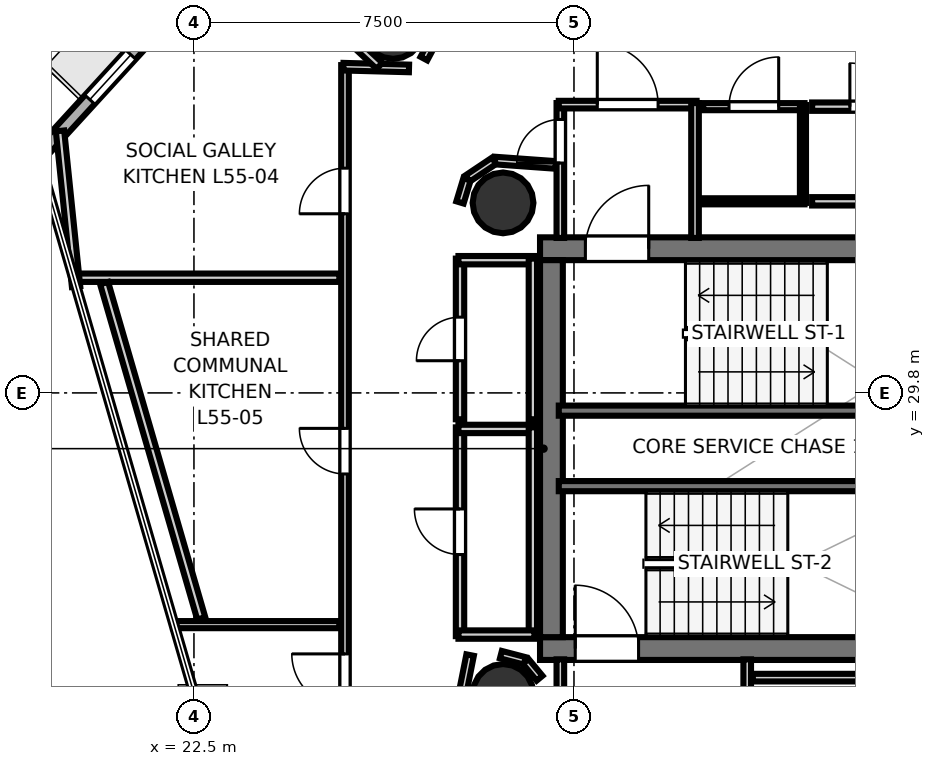
"""IFC4 building model, lengths in metres.
Left out: names, types, materials, properties, quantities, classifications, styles, units other than length and angle.
Written with IfcOpenShell. Run it as: python <this file> out.ifc"""

import sys

from ifc_helpers import new_model, si_unit, direction, frame, frame_2d, origin, origin_2d, place, context, subcontext, project, spatial, rectangle, hollow_circle, extrude, element, fill, save


model = new_model("IFC4")
c1 = context("Model", 3, precision=1e-05, world=origin(), true_north=direction((0.0, 1.0)))
c2 = subcontext(c1, "Body", "Model", "MODEL_VIEW")
j1 = project(units=[si_unit("LENGTHUNIT", "METRE"), si_unit("PLANEANGLEUNIT", "RADIAN")], contexts=[c1])
p1 = place(None, origin())
s1 = spatial("IfcSite", under=j1, at=p1, CompositionType="ELEMENT")
p2 = place(p1, origin())
s2 = spatial("IfcBuilding", under=s1, at=p2, CompositionType="ELEMENT")
p3 = place(p2, frame((0.0, 0.0, 215.1)))
s3 = spatial("IfcBuildingStorey", under=s2, at=p3, CompositionType="ELEMENT", Elevation=215.1)
p4 = place(p3, frame((29.33, 32.645, 0.0), z_axis=(0.0, 0.0, 1.0), x_axis=(1.0, 0.0, 0.0)))
e1 = element("IfcWall", 1, at=p4, inside=s3, PredefinedType="SHEAR", context=c2, shape_type="SweptSolid", body=[
    extrude(rectangle(XDim=10.52, YDim=0.45, at=frame_2d((5.26, 0.0))), origin(), (0.0, 0.0, 1.0), 3.52),
])
p5 = place(p4, frame((0.895, 0.0, 0.0)))
e2 = element("IfcOpeningElement", 2, at=p5, cuts=e1, PredefinedType="OPENING", context=c2, shape_type="SweptSolid", body=[
    extrude(rectangle(XDim=1.25, YDim=2.15, at=frame_2d((0.625, 1.075))), frame((0.0, 0.235, 0.0), z_axis=(0.0, -1.0, 0.0), x_axis=(1.0, 0.0, 0.0)), (0.0, 0.0, 1.0), 0.47),
])
p6 = place(p3, frame((29.33, 24.755, 0.0), z_axis=(0.0, 0.0, 1.0), x_axis=(1.0, 0.0, 0.0)))
e3 = element("IfcWall", 3, at=p6, inside=s3, PredefinedType="SHEAR", context=c2, shape_type="SweptSolid", body=[
    extrude(rectangle(XDim=10.52, YDim=0.45, at=frame_2d((5.26, 0.0))), origin(), (0.0, 0.0, 1.0), 3.52),
])
p7 = place(p6, frame((0.695, 0.0, 0.0)))
e4 = element("IfcOpeningElement", 4, at=p7, cuts=e3, PredefinedType="OPENING", context=c2, shape_type="SweptSolid", body=[
    extrude(rectangle(XDim=1.25, YDim=2.15, at=frame_2d((0.625, 1.075))), frame((0.0, 0.235, 0.0), z_axis=(0.0, -1.0, 0.0), x_axis=(1.0, 0.0, 0.0)), (0.0, 0.0, 1.0), 0.47),
])
p8 = place(p3, frame((29.555, 24.98, 0.0), z_axis=(0.0, 0.0, 1.0), x_axis=(0.0, 1.0, 0.0)))
e5 = element("IfcWall", 5, at=p8, inside=s3, PredefinedType="SHEAR", context=c2, shape_type="SweptSolid", body=[
    extrude(rectangle(XDim=7.44, YDim=0.45, at=frame_2d((3.72, 0.0))), origin(), (0.0, 0.0, 1.0), 3.52),
])
for number, where, z_axis, x_axis in (
    (6, (28.6, 33.55, 0.0), (0.0, 0.0, 1.0), (1.0, 0.0, 0.0)),
    (7, (28.6, 23.85, 0.0), (0.0, 0.0, 1.0), (1.0, 0.0, 0.0)),
    (8, (26.431, 36.992, 0.0), (0.0, 0.0, 1.0), (1.0, 0.0, 0.0)),
):
    element("IfcColumn", number, at=place(p3, frame(where, z_axis=z_axis, x_axis=x_axis)), inside=s3, PredefinedType="COLUMN", context=c2, shape_type="SweptSolid", body=[
        extrude(hollow_circle(Radius=0.6, WallThickness=0.03, at=origin_2d()), origin(), (0.0, 0.0, 1.0), 3.7),
    ])
p9 = place(p3, frame((24.17, 39.66, 0.0), z_axis=(0.0, 0.0, 1.0), x_axis=(-0.674986503916, -0.73783007497, 0.0)))
e9 = element("IfcWall", 9, at=p9, inside=s3, PredefinedType="SOLIDWALL", context=c2, shape_type="SweptSolid", body=[
    extrude(rectangle(XDim=7.028, YDim=0.26, at=frame_2d((3.514, 0.0))), origin(), (0.0, 0.0, 1.0), 3.52),
])
p10 = place(p9, frame((1.508, 0.0, 0.9)))
e10 = element("IfcOpeningElement", 10, at=p10, cuts=e9, PredefinedType="OPENING", context=c2, shape_type="SweptSolid", body=[
    extrude(rectangle(XDim=1.2, YDim=2.0, at=frame_2d((0.6, 1.0))), frame((0.0, 0.14, 0.0), z_axis=(0.0, -1.0, 0.0), x_axis=(1.0, 0.0, 0.0)), (0.0, 0.0, 1.0), 0.28),
])
p11 = place(p9, frame((4.32, 0.0, 0.9)))
e11 = element("IfcOpeningElement", 11, at=p11, cuts=e9, PredefinedType="OPENING", context=c2, shape_type="SweptSolid", body=[
    extrude(rectangle(XDim=1.2, YDim=2.0, at=frame_2d((0.6, 1.0))), frame((0.0, 0.14, 0.0), z_axis=(0.0, -1.0, 0.0), x_axis=(1.0, 0.0, 0.0)), (0.0, 0.0, 1.0), 0.28),
])
p12 = place(p3, frame((29.7, 29.45, 0.0), z_axis=(0.0, 0.0, 1.0), x_axis=(1.0, 0.0, 0.0)))
e12 = element("IfcWall", 12, at=p12, inside=s3, PredefinedType="SOLIDWALL", context=c2, shape_type="SweptSolid", body=[
    extrude(rectangle(XDim=8.3, YDim=0.2, at=frame_2d((4.15, 0.0))), origin(), (0.0, 0.0, 1.0), 3.52),
])
p13 = place(p3, frame((29.7, 27.96, 0.0), z_axis=(0.0, 0.0, 1.0), x_axis=(1.0, 0.0, 0.0)))
e13 = element("IfcWall", 13, at=p13, inside=s3, PredefinedType="SOLIDWALL", context=c2, shape_type="SweptSolid", body=[
    extrude(rectangle(XDim=7.75, YDim=0.2, at=frame_2d((3.875, 0.0))), origin(), (0.0, 0.0, 1.0), 3.52),
])
p14 = place(p3, frame((29.731, 32.858, 0.0), z_axis=(0.0, 0.0, 1.0), x_axis=(0.0, 1.0, 0.0)))
e14 = element("IfcWall", 14, at=p14, inside=s3, PredefinedType="PARTITIONING", context=c2, shape_type="SweptSolid", body=[
    extrude(rectangle(XDim=2.662, YDim=0.15, at=frame_2d((1.331, 0.0))), origin(), (0.0, 0.0, 1.0), 2.84),
])
p15 = place(p14, frame((1.478, 0.0, 0.0)))
e15 = element("IfcOpeningElement", 15, at=p15, cuts=e14, PredefinedType="OPENING", context=c2, shape_type="SweptSolid", body=[
    extrude(rectangle(XDim=0.86, YDim=2.05, at=frame_2d((0.43, 1.025))), frame((0.0, 0.085, 0.0), z_axis=(0.0, -1.0, 0.0), x_axis=(1.0, 0.0, 0.0)), (0.0, 0.0, 1.0), 0.17),
])
p16 = place(p3, frame((29.7, 35.489, 0.0), z_axis=(0.0, 0.0, 1.0), x_axis=(1.0, 0.0, 0.0)))
e16 = element("IfcWall", 16, at=p16, inside=s3, PredefinedType="PARTITIONING", context=c2, shape_type="SweptSolid", body=[
    extrude(rectangle(XDim=2.72, YDim=0.15, at=frame_2d((1.36, 0.0))), origin(), (0.0, 0.0, 1.0), 2.84),
])
p17 = place(p16, frame((0.76, 0.0, 0.0)))
e17 = element("IfcOpeningElement", 17, at=p17, cuts=e16, PredefinedType="OPENING", context=c2, shape_type="SweptSolid", body=[
    extrude(rectangle(XDim=1.2, YDim=2.15, at=frame_2d((0.6, 1.075))), frame((0.0, 0.085, 0.0), z_axis=(0.0, -1.0, 0.0), x_axis=(1.0, 0.0, 0.0)), (0.0, 0.0, 1.0), 0.17),
])
p18 = place(p3, frame((32.389, 35.52, 0.0), z_axis=(0.0, 0.0, 1.0), x_axis=(0.0, -1.0, 0.0)))
e18 = element("IfcWall", 18, at=p18, inside=s3, PredefinedType="PARTITIONING", context=c2, shape_type="SweptSolid", body=[
    extrude(rectangle(XDim=2.662, YDim=0.15, at=frame_2d((1.331, 0.0))), origin(), (0.0, 0.0, 1.0), 2.84),
])
for number, where, z_axis, x_axis in (
    (19, (29.731, 21.85, 0.0), (0.0, 0.0, 1.0), (0.0, 1.0, 0.0)),
    (20, (33.419, 24.542, 0.0), (0.0, 0.0, 1.0), (0.0, -1.0, 0.0)),
):
    element("IfcWall", number, at=place(p3, frame(where, z_axis=z_axis, x_axis=x_axis)), inside=s3, PredefinedType="PARTITIONING", context=c2, shape_type="SweptSolid", body=[
        extrude(rectangle(XDim=2.692, YDim=0.15, at=frame_2d((1.346, 0.0))), origin(), (0.0, 0.0, 1.0), 2.84),
    ])
p19 = place(p3, frame((34.55, 33.581, 0.0), z_axis=(0.0, 0.0, 1.0), x_axis=(-1.0, 0.0, 0.0)))
e21 = element("IfcWall", 21, at=p19, inside=s3, PredefinedType="PARTITIONING", context=c2, shape_type="SweptSolid", body=[
    extrude(rectangle(XDim=2.0, YDim=0.12, at=frame_2d((1.0, 0.0))), origin(), (0.0, 0.0, 1.0), 2.84),
])
p20 = place(p3, frame((32.55, 35.449, 0.0), z_axis=(0.0, 0.0, 1.0), x_axis=(1.0, 0.0, 0.0)))
e22 = element("IfcWall", 22, at=p20, inside=s3, PredefinedType="PARTITIONING", context=c2, shape_type="SweptSolid", body=[
    extrude(rectangle(XDim=2.0, YDim=0.14, at=frame_2d((1.0, 0.0))), origin(), (0.0, 0.0, 1.0), 2.84),
])
p21 = place(p20, frame((0.51, 0.0, 0.0)))
e23 = element("IfcOpeningElement", 23, at=p21, cuts=e22, PredefinedType="OPENING", context=c2, shape_type="SweptSolid", body=[
    extrude(rectangle(XDim=0.98, YDim=2.1, at=frame_2d((0.49, 1.05))), frame((0.0, 0.08, 0.0), z_axis=(0.0, -1.0, 0.0), x_axis=(1.0, 0.0, 0.0)), (0.0, 0.0, 1.0), 0.16),
])
p22 = place(p3, frame((34.519, 35.48, 0.0), z_axis=(0.0, 0.0, 1.0), x_axis=(0.0, -1.0, 0.0)))
e24 = element("IfcWall", 24, at=p22, inside=s3, PredefinedType="PARTITIONING", context=c2, shape_type="SweptSolid", body=[
    extrude(rectangle(XDim=1.93, YDim=0.12, at=frame_2d((0.965, 0.0))), origin(), (0.0, 0.0, 1.0), 2.84),
])
p23 = place(p3, frame((37.05, 33.581, 0.0), z_axis=(0.0, 0.0, 1.0), x_axis=(-1.0, 0.0, 0.0)))
e25 = element("IfcWall", 25, at=p23, inside=s3, PredefinedType="PLUMBINGWALL", context=c2, shape_type="SweptSolid", body=[
    extrude(rectangle(XDim=2.35, YDim=0.165, at=frame_2d((1.175, 0.0))), origin(), (0.0, 0.0, 1.0), 2.84),
])
p24 = place(p3, frame((34.7, 35.449, 0.0), z_axis=(0.0, 0.0, 1.0), x_axis=(1.0, 0.0, 0.0)))
e26 = element("IfcWall", 26, at=p24, inside=s3, PredefinedType="PLUMBINGWALL", context=c2, shape_type="SweptSolid", body=[
    extrude(rectangle(XDim=2.35, YDim=0.165, at=frame_2d((1.175, 0.0))), origin(), (0.0, 0.0, 1.0), 2.84),
])
p25 = place(p24, frame((0.745, 0.0, 0.0)))
e27 = element("IfcOpeningElement", 27, at=p25, cuts=e26, PredefinedType="OPENING", context=c2, shape_type="SweptSolid", body=[
    extrude(rectangle(XDim=0.86, YDim=2.05, at=frame_2d((0.43, 1.025))), frame((0.0, 0.093, 0.0), z_axis=(0.0, -1.0, 0.0), x_axis=(1.0, 0.0, 0.0)), (0.0, 0.0, 1.0), 0.185),
])
p26 = place(p3, frame((27.751, 25.0, 0.0), z_axis=(0.0, 0.0, 1.0), x_axis=(0.0, 1.0, 0.0)))
e28 = element("IfcWall", 28, at=p26, inside=s3, PredefinedType="PLUMBINGWALL", context=c2, shape_type="SweptSolid", body=[
    extrude(rectangle(XDim=4.12, YDim=0.165, at=frame_2d((2.06, 0.0))), origin(), (0.0, 0.0, 1.0), 2.84),
])
p27 = place(p26, frame((1.61, 0.0, 0.0)))
e29 = element("IfcOpeningElement", 29, at=p27, cuts=e28, PredefinedType="OPENING", context=c2, shape_type="SweptSolid", body=[
    extrude(rectangle(XDim=0.9, YDim=2.1, at=frame_2d((0.45, 1.05))), frame((0.0, 0.093, 0.0), z_axis=(0.0, -1.0, 0.0), x_axis=(1.0, 0.0, 0.0)), (0.0, 0.0, 1.0), 0.185),
])
p28 = place(p3, frame((27.72, 29.089, 0.0), z_axis=(0.0, 0.0, 1.0), x_axis=(1.0, 0.0, 0.0)))
e30 = element("IfcWall", 30, at=p28, inside=s3, PredefinedType="PLUMBINGWALL", context=c2, shape_type="SweptSolid", body=[
    extrude(rectangle(XDim=1.5, YDim=0.165, at=frame_2d((0.75, 0.0))), origin(), (0.0, 0.0, 1.0), 2.84),
])
p29 = place(p3, frame((29.189, 29.12, 0.0), z_axis=(0.0, 0.0, 1.0), x_axis=(0.0, -1.0, 0.0)))
e31 = element("IfcWall", 31, at=p29, inside=s3, PredefinedType="PLUMBINGWALL", context=c2, shape_type="SweptSolid", body=[
    extrude(rectangle(XDim=4.12, YDim=0.165, at=frame_2d((2.06, 0.0))), origin(), (0.0, 0.0, 1.0), 2.84),
])
p30 = place(p3, frame((29.22, 25.031, 0.0), z_axis=(0.0, 0.0, 1.0), x_axis=(-1.0, 0.0, 0.0)))
e32 = element("IfcWall", 32, at=p30, inside=s3, PredefinedType="PLUMBINGWALL", context=c2, shape_type="SweptSolid", body=[
    extrude(rectangle(XDim=1.5, YDim=0.165, at=frame_2d((0.75, 0.0))), origin(), (0.0, 0.0, 1.0), 2.84),
])
p31 = place(p3, frame((27.751, 29.28, 0.0), z_axis=(0.0, 0.0, 1.0), x_axis=(0.0, 1.0, 0.0)))
e33 = element("IfcWall", 33, at=p31, inside=s3, PredefinedType="PLUMBINGWALL", context=c2, shape_type="SweptSolid", body=[
    extrude(rectangle(XDim=3.17, YDim=0.165, at=frame_2d((1.585, 0.0))), origin(), (0.0, 0.0, 1.0), 2.84),
])
p32 = place(p31, frame((1.155, 0.0, 0.0)))
e34 = element("IfcOpeningElement", 34, at=p32, cuts=e33, PredefinedType="OPENING", context=c2, shape_type="SweptSolid", body=[
    extrude(rectangle(XDim=0.86, YDim=2.05, at=frame_2d((0.43, 1.025))), frame((0.0, 0.093, 0.0), z_axis=(0.0, -1.0, 0.0), x_axis=(1.0, 0.0, 0.0)), (0.0, 0.0, 1.0), 0.185),
])
p33 = place(p3, frame((27.72, 32.419, 0.0), z_axis=(0.0, 0.0, 1.0), x_axis=(1.0, 0.0, 0.0)))
e35 = element("IfcWall", 35, at=p33, inside=s3, PredefinedType="PLUMBINGWALL", context=c2, shape_type="SweptSolid", body=[
    extrude(rectangle(XDim=1.5, YDim=0.165, at=frame_2d((0.75, 0.0))), origin(), (0.0, 0.0, 1.0), 2.84),
])
p34 = place(p3, frame((29.189, 32.45, 0.0), z_axis=(0.0, 0.0, 1.0), x_axis=(0.0, -1.0, 0.0)))
e36 = element("IfcWall", 36, at=p34, inside=s3, PredefinedType="PLUMBINGWALL", context=c2, shape_type="SweptSolid", body=[
    extrude(rectangle(XDim=3.17, YDim=0.165, at=frame_2d((1.585, 0.0))), origin(), (0.0, 0.0, 1.0), 2.84),
])
p35 = place(p3, frame((29.321, 24.17, 0.0), z_axis=(0.0, 0.0, 1.0), x_axis=(-0.638008265708, 0.770029514296, 0.0)))
e37 = element("IfcWall", 37, at=p35, inside=s3, PredefinedType="PARTITIONING", context=c2, shape_type="SweptSolid", body=[
    extrude(rectangle(XDim=0.431, YDim=0.15, at=frame_2d((0.215, 0.0))), origin(), (0.0, 0.0, 1.0), 2.84),
])
p36 = place(p3, frame((29.03, 24.512, 0.0), z_axis=(0.0, 0.0, 1.0), x_axis=(-0.967681003213, 0.252177469296, 0.0)))
e38 = element("IfcWall", 38, at=p36, inside=s3, PredefinedType="PARTITIONING", context=c2, shape_type="SweptSolid", body=[
    extrude(rectangle(XDim=0.488, YDim=0.15, at=frame_2d((0.244, 0.0))), origin(), (0.0, 0.0, 1.0), 2.84),
])
p37 = place(p3, frame((37.703, 24.181, 0.0), z_axis=(0.0, 0.0, 1.0), x_axis=(-1.0, 0.0, 0.0)))
e39 = element("IfcWall", 39, at=p37, inside=s3, PredefinedType="PARTITIONING", context=c2, shape_type="SweptSolid", body=[
    extrude(rectangle(XDim=4.173, YDim=0.15, at=frame_2d((2.086, 0.0))), origin(), (0.0, 0.0, 1.0), 2.84),
])
p38 = place(p3, frame((29.64, 34.299, 0.0), z_axis=(0.0, 0.0, 1.0), x_axis=(-0.997392224386, 0.072171675429, 0.0)))
e40 = element("IfcWall", 40, at=p38, inside=s3, PredefinedType="PARTITIONING", context=c2, shape_type="SweptSolid", body=[
    extrude(rectangle(XDim=1.201, YDim=0.15, at=frame_2d((0.601, 0.0))), origin(), (0.0, 0.0, 1.0), 2.84),
])
p39 = place(p3, frame((28.423, 34.38, 0.0), z_axis=(0.0, 0.0, 1.0), x_axis=(-0.831571279003, -0.555418047903, 0.0)))
e41 = element("IfcWall", 41, at=p39, inside=s3, PredefinedType="PARTITIONING", context=c2, shape_type="SweptSolid", body=[
    extrude(rectangle(XDim=0.628, YDim=0.15, at=frame_2d((0.314, 0.0))), origin(), (0.0, 0.0, 1.0), 2.84),
])
p40 = place(p3, frame((27.888, 34.015, 0.0), z_axis=(0.0, 0.0, 1.0), x_axis=(-0.290263585829, -0.956946733492, 0.0)))
e42 = element("IfcWall", 42, at=p40, inside=s3, PredefinedType="PARTITIONING", context=c2, shape_type="SweptSolid", body=[
    extrude(rectangle(XDim=0.476, YDim=0.15, at=frame_2d((0.238, 0.0))), origin(), (0.0, 0.0, 1.0), 2.84),
])
p41 = place(p3, frame((27.95, 24.626, 0.0), z_axis=(0.0, 0.0, 1.0), x_axis=(-0.195125950178, -0.980778192848, 0.0)))
e43 = element("IfcWall", 43, at=p41, inside=s3, PredefinedType="PARTITIONING", context=c2, shape_type="SweptSolid", body=[
    extrude(rectangle(XDim=0.948, YDim=0.15, at=frame_2d((0.474, 0.0))), origin(), (0.0, 0.0, 1.0), 2.84),
])
p42 = place(p3, frame((25.481, 18.05, 0.0), z_axis=(0.0, 0.0, 1.0), x_axis=(0.0, 1.0, 0.0)))
e44 = element("IfcWall", 44, at=p42, inside=s3, PredefinedType="PARTITIONING", context=c2, shape_type="SweptSolid", body=[
    extrude(rectangle(XDim=18.219, YDim=0.15, at=frame_2d((9.109, 0.0))), origin(), (0.0, 0.0, 1.0), 2.84),
])
p43 = place(p42, frame((5.549, 0.0, 0.0)))
e45 = element("IfcOpeningElement", 45, at=p43, cuts=e44, PredefinedType="OPENING", context=c2, shape_type="SweptSolid", body=[
    extrude(rectangle(XDim=1.05, YDim=2.15, at=frame_2d((0.525, 1.075))), frame((0.0, 0.085, 0.0), z_axis=(0.0, -1.0, 0.0), x_axis=(1.0, 0.0, 0.0)), (0.0, 0.0, 1.0), 0.17),
])
p44 = place(p42, frame((15.285, 0.0, 0.0)))
e46 = element("IfcOpeningElement", 46, at=p44, cuts=e44, PredefinedType="OPENING", context=c2, shape_type="SweptSolid", body=[
    extrude(rectangle(XDim=0.9, YDim=2.1, at=frame_2d((0.45, 1.05))), frame((0.0, 0.085, 0.0), z_axis=(0.0, -1.0, 0.0), x_axis=(1.0, 0.0, 0.0)), (0.0, 0.0, 1.0), 0.17),
])
p45 = place(p42, frame((10.15, 0.0, 0.0)))
e47 = element("IfcOpeningElement", 47, at=p45, cuts=e44, PredefinedType="OPENING", context=c2, shape_type="SweptSolid", body=[
    extrude(rectangle(XDim=0.9, YDim=2.1, at=frame_2d((0.45, 1.05))), frame((0.0, 0.085, 0.0), z_axis=(0.0, -1.0, 0.0), x_axis=(1.0, 0.0, 0.0)), (0.0, 0.0, 1.0), 0.17),
])
p46 = place(p3, frame((25.449, 36.238, 0.0), z_axis=(0.0, 0.0, 1.0), x_axis=(0.999651698073, -0.026390955635, 0.0)))
e48 = element("IfcWall", 48, at=p46, inside=s3, PredefinedType="PARTITIONING", context=c2, shape_type="SweptSolid", body=[
    extrude(rectangle(XDim=1.295, YDim=0.15, at=frame_2d((0.647, 0.0))), origin(), (0.0, 0.0, 1.0), 2.84),
])
p47 = place(p3, frame((27.038, 36.398, 0.0), z_axis=(0.0, 0.0, 1.0), x_axis=(0.471865548338, 0.881670519123, 0.0)))
e49 = element("IfcWall", 49, at=p47, inside=s3, PredefinedType="PARTITIONING", context=c2, shape_type="SweptSolid", body=[
    extrude(rectangle(XDim=0.476, YDim=0.15, at=frame_2d((0.238, 0.0))), origin(), (0.0, 0.0, 1.0), 2.84),
])
p48 = place(p3, frame((22.086, 25.227, 0.0), z_axis=(0.0, 0.0, 1.0), x_axis=(1.0, 0.0, 0.0)))
e50 = element("IfcWall", 50, at=p48, inside=s3, PredefinedType="PARTITIONING", context=c2, shape_type="SweptSolid", body=[
    extrude(rectangle(XDim=3.284, YDim=0.14, at=frame_2d((1.642, 0.0))), origin(), (0.0, 0.0, 1.0), 2.84),
])
p49 = place(p3, frame((25.708, 36.678, 0.0), z_axis=(0.0, 0.0, 1.0), x_axis=(0.730846282416, -0.682542095023, 0.0)))
e51 = element("IfcWall", 51, at=p49, inside=s3, PredefinedType="PLUMBINGWALL", context=c2, shape_type="SweptSolid", body=[
    extrude(rectangle(XDim=0.622, YDim=0.165, at=frame_2d((0.311, 0.0))), origin(), (0.0, 0.0, 1.0), 2.84),
])
p50 = place(p3, frame((25.37, 32.073, 0.0), z_axis=(0.0, 0.0, 1.0), x_axis=(-1.0, 0.0, 0.0)))
e52 = element("IfcWall", 52, at=p50, inside=s3, PredefinedType="PLUMBINGWALL", context=c2, shape_type="SweptSolid", body=[
    extrude(rectangle(XDim=5.267, YDim=0.165, at=frame_2d((2.634, 0.0))), origin(), (0.0, 0.0, 1.0), 2.84),
])
p51 = place(p3, frame((20.174, 31.897, 0.0), z_axis=(0.0, 0.0, 1.0), x_axis=(-0.102570229054, 0.99472576528, 0.0)))
e53 = element("IfcWall", 53, at=p51, inside=s3, PredefinedType="PLUMBINGWALL", context=c2, shape_type="SweptSolid", body=[
    extrude(rectangle(XDim=3.09, YDim=0.165, at=frame_2d((1.545, 0.0))), origin(), (0.0, 0.0, 1.0), 2.84),
])
p52 = place(p3, frame((22.644, 25.351, 0.0), z_axis=(0.0, 0.0, 1.0), x_axis=(-0.278305064514, 0.960492733479, 0.0)))
e54 = element("IfcWall", 54, at=p52, inside=s3, PredefinedType="PLUMBINGWALL", context=c2, shape_type="SweptSolid", body=[
    extrude(rectangle(XDim=6.888, YDim=0.165, at=frame_2d((3.444, 0.0))), origin(), (0.0, 0.0, 1.0), 2.84),
])
p53 = place(p5, origin())
e55 = element("IfcDoor", 55, at=p53, inside=s3, OperationType="SINGLE_SWING_RIGHT", PredefinedType="DOOR", context=c2, shape_type="SweptSolid", body=[
    extrude(rectangle(XDim=1.25, YDim=2.15, at=frame_2d((0.625, 1.075))), frame((0.0, 0.025, 0.0), z_axis=(0.0, -1.0, 0.0), x_axis=(1.0, 0.0, 0.0)), (0.0, 0.0, 1.0), 0.05),
])
fill(e2, e55)
p54 = place(p7, origin())
e56 = element("IfcDoor", 56, at=p54, inside=s3, OperationType="SINGLE_SWING_LEFT", PredefinedType="DOOR", context=c2, shape_type="SweptSolid", body=[
    extrude(rectangle(XDim=1.25, YDim=2.15, at=frame_2d((0.625, 1.075))), frame((0.0, 0.025, 0.0), z_axis=(0.0, -1.0, 0.0), x_axis=(1.0, 0.0, 0.0)), (0.0, 0.0, 1.0), 0.05),
])
fill(e4, e56)
p55 = place(p17, origin())
e57 = element("IfcDoor", 57, at=p55, inside=s3, OperationType="SINGLE_SWING_LEFT", PredefinedType="DOOR", context=c2, shape_type="SweptSolid", body=[
    extrude(rectangle(XDim=1.2, YDim=2.15, at=frame_2d((0.6, 1.075))), frame((0.0, 0.025, 0.0), z_axis=(0.0, -1.0, 0.0), x_axis=(1.0, 0.0, 0.0)), (0.0, 0.0, 1.0), 0.05),
])
fill(e17, e57)
p56 = place(p21, origin())
e58 = element("IfcDoor", 58, at=p56, inside=s3, OperationType="SINGLE_SWING_RIGHT", PredefinedType="DOOR", context=c2, shape_type="SweptSolid", body=[
    extrude(rectangle(XDim=0.98, YDim=2.1, at=frame_2d((0.49, 1.05))), frame((0.0, 0.025, 0.0), z_axis=(0.0, -1.0, 0.0), x_axis=(1.0, 0.0, 0.0)), (0.0, 0.0, 1.0), 0.05),
])
fill(e23, e58)
p57 = place(p25, origin())
e59 = element("IfcDoor", 59, at=p57, inside=s3, OperationType="SINGLE_SWING_LEFT", PredefinedType="DOOR", context=c2, shape_type="SweptSolid", body=[
    extrude(rectangle(XDim=0.86, YDim=2.05, at=frame_2d((0.43, 1.025))), frame((0.0, 0.025, 0.0), z_axis=(0.0, -1.0, 0.0), x_axis=(1.0, 0.0, 0.0)), (0.0, 0.0, 1.0), 0.05),
])
fill(e27, e59)
p58 = place(p27, origin())
e60 = element("IfcDoor", 60, at=p58, inside=s3, OperationType="SINGLE_SWING_RIGHT", PredefinedType="DOOR", context=c2, shape_type="SweptSolid", body=[
    extrude(rectangle(XDim=0.9, YDim=2.1, at=frame_2d((0.45, 1.05))), frame((0.0, 0.025, 0.0), z_axis=(0.0, -1.0, 0.0), x_axis=(1.0, 0.0, 0.0)), (0.0, 0.0, 1.0), 0.05),
])
fill(e29, e60)
p59 = place(p32, origin())
e61 = element("IfcDoor", 61, at=p59, inside=s3, OperationType="SINGLE_SWING_LEFT", PredefinedType="DOOR", context=c2, shape_type="SweptSolid", body=[
    extrude(rectangle(XDim=0.86, YDim=2.05, at=frame_2d((0.43, 1.025))), frame((0.0, 0.025, 0.0), z_axis=(0.0, -1.0, 0.0), x_axis=(1.0, 0.0, 0.0)), (0.0, 0.0, 1.0), 0.05),
])
fill(e34, e61)
p60 = place(p15, origin())
e62 = element("IfcDoor", 62, at=p60, inside=s3, OperationType="SINGLE_SWING_LEFT", PredefinedType="DOOR", context=c2, shape_type="SweptSolid", body=[
    extrude(rectangle(XDim=0.86, YDim=2.05, at=frame_2d((0.43, 1.025))), frame((0.0, 0.025, 0.0), z_axis=(0.0, -1.0, 0.0), x_axis=(1.0, 0.0, 0.0)), (0.0, 0.0, 1.0), 0.05),
])
fill(e15, e62)
p61 = place(p43, origin())
e63 = element("IfcDoor", 63, at=p61, inside=s3, OperationType="SINGLE_SWING_RIGHT", PredefinedType="DOOR", context=c2, shape_type="SweptSolid", body=[
    extrude(rectangle(XDim=1.05, YDim=2.15, at=frame_2d((0.525, 1.075))), frame((0.0, 0.025, 0.0), z_axis=(0.0, -1.0, 0.0), x_axis=(1.0, 0.0, 0.0)), (0.0, 0.0, 1.0), 0.05),
])
fill(e45, e63)
p62 = place(p44, origin())
e64 = element("IfcDoor", 64, at=p62, inside=s3, OperationType="SINGLE_SWING_LEFT", PredefinedType="DOOR", context=c2, shape_type="SweptSolid", body=[
    extrude(rectangle(XDim=0.9, YDim=2.1, at=frame_2d((0.45, 1.05))), frame((0.0, 0.025, 0.0), z_axis=(0.0, -1.0, 0.0), x_axis=(1.0, 0.0, 0.0)), (0.0, 0.0, 1.0), 0.05),
])
fill(e46, e64)
p63 = place(p45, origin())
e65 = element("IfcDoor", 65, at=p63, inside=s3, OperationType="SINGLE_SWING_RIGHT", PredefinedType="DOOR", context=c2, shape_type="SweptSolid", body=[
    extrude(rectangle(XDim=0.9, YDim=2.1, at=frame_2d((0.45, 1.05))), frame((0.0, 0.025, 0.0), z_axis=(0.0, -1.0, 0.0), x_axis=(1.0, 0.0, 0.0)), (0.0, 0.0, 1.0), 0.05),
])
fill(e47, e65)
p64 = place(p11, origin())
e66 = element("IfcWindow", 66, at=p64, inside=s3, PartitioningType="SINGLE_PANEL", PredefinedType="WINDOW", context=c2, shape_type="SweptSolid", body=[
    extrude(rectangle(XDim=1.2, YDim=2.0, at=frame_2d((0.6, 1.0))), frame((0.0, 0.03, 0.0), z_axis=(0.0, -1.0, 0.0), x_axis=(1.0, 0.0, 0.0)), (0.0, 0.0, 1.0), 0.06),
])
fill(e11, e66)
save(model, sys.argv[1])
